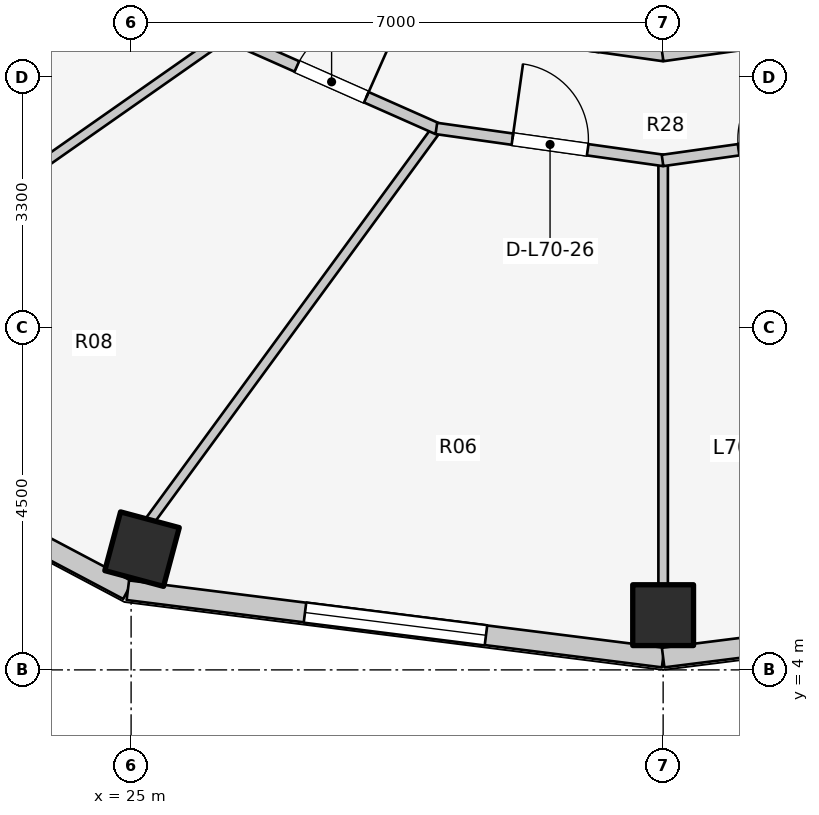
"""IFC4 building model, lengths in metres.
Left out: names, types, materials, properties, quantities, classifications, styles, units other than length and angle.
Written with IfcOpenShell. Run it as: python <this file> out.ifc"""

import sys

from ifc_helpers import new_model, si_unit, direction, frame, frame_2d, origin, origin_2d, place, context, subcontext, project, spatial, rectangle, extrude, element, fill, save


model = new_model("IFC4")
c1 = context("Model", 3, precision=1e-05, world=origin(), true_north=direction((0.0, 1.0)))
c2 = subcontext(c1, "Body", "Model", "MODEL_VIEW")
j1 = project(units=[si_unit("LENGTHUNIT", "METRE"), si_unit("PLANEANGLEUNIT", "RADIAN")], contexts=[c1])
p1 = place(None, origin())
s1 = spatial("IfcSite", under=j1, at=p1, CompositionType="ELEMENT")
p2 = place(p1, origin())
s2 = spatial("IfcBuilding", under=s1, at=p2, CompositionType="ELEMENT")
p3 = place(p2, frame((0.0, 0.0, 229.5)))
s3 = spatial("IfcBuildingStorey", under=s2, at=p3, CompositionType="ELEMENT", Elevation=229.5)
for number, where, z_axis, x_axis in (
    (1, (25.144, 5.589, 0.0), (0.0, 0.0, 1.0), (-0.259, -0.966, 0.0)),
    (2, (32.0, 4.72, 0.0), (0.0, 0.0, 1.0), (0.0, -1.0, 0.0)),
):
    element("IfcColumn", number, at=place(p3, frame(where, z_axis=z_axis, x_axis=x_axis)), inside=s3, PredefinedType="COLUMN", context=c2, shape_type="SweptSolid", body=[
        extrude(rectangle(XDim=0.8, YDim=0.8, at=origin_2d()), origin(), (0.0, 0.0, 1.0), 3.1),
    ])
p4 = place(p3, frame((20.13, 7.601, 0.0), z_axis=(0.0, 0.0, 1.0), x_axis=(0.884000981341, -0.46748504253, 0.0)))
e3 = element("IfcWall", 3, at=p4, inside=s3, PredefinedType="STANDARD", context=c2, shape_type="SweptSolid", body=[
    extrude(rectangle(XDim=5.46, YDim=0.26, at=frame_2d((2.73, 0.0))), origin(), (0.0, 0.0, 1.0), 2.85),
])
p5 = place(p4, frame((1.98, 0.0, 0.75)))
e4 = element("IfcOpeningElement", 4, at=p5, cuts=e3, PredefinedType="OPENING", context=c2, shape_type="SweptSolid", body=[
    extrude(rectangle(XDim=1.5, YDim=1.6, at=frame_2d((0.75, 0.8))), frame((0.0, 0.14, 0.0), z_axis=(0.0, -1.0, 0.0), x_axis=(1.0, 0.0, 0.0)), (0.0, 0.0, 1.0), 0.28),
])
p6 = place(p3, frame((24.957, 5.048, 0.0), z_axis=(0.0, 0.0, 1.0), x_axis=(0.992180211307, -0.124813574142, 0.0)))
e5 = element("IfcWall", 5, at=p6, inside=s3, PredefinedType="STANDARD", context=c2, shape_type="SweptSolid", body=[
    extrude(rectangle(XDim=7.098, YDim=0.26, at=frame_2d((3.549, 0.0))), origin(), (0.0, 0.0, 1.0), 2.85),
])
p7 = place(p6, frame((2.349, 0.0, 0.75)))
e6 = element("IfcOpeningElement", 6, at=p7, cuts=e5, PredefinedType="OPENING", context=c2, shape_type="SweptSolid", body=[
    extrude(rectangle(XDim=2.4, YDim=1.7, at=frame_2d((1.2, 0.85))), frame((0.0, 0.14, 0.0), z_axis=(0.0, -1.0, 0.0), x_axis=(1.0, 0.0, 0.0)), (0.0, 0.0, 1.0), 0.28),
])
p8 = place(p3, frame((32.0, 4.162, 0.0), z_axis=(0.0, 0.0, 1.0), x_axis=(0.992180211307, 0.124813574142, 0.0)))
e7 = element("IfcWall", 7, at=p8, inside=s3, PredefinedType="STANDARD", context=c2, shape_type="SweptSolid", body=[
    extrude(rectangle(XDim=7.098, YDim=0.26, at=frame_2d((3.549, 0.0))), origin(), (0.0, 0.0, 1.0), 2.85),
])
p9 = place(p8, frame((2.799, 0.0, 0.75)))
e8 = element("IfcOpeningElement", 8, at=p9, cuts=e7, PredefinedType="OPENING", context=c2, shape_type="SweptSolid", body=[
    extrude(rectangle(XDim=1.5, YDim=1.6, at=frame_2d((0.75, 0.8))), frame((0.0, 0.14, 0.0), z_axis=(0.0, -1.0, 0.0), x_axis=(1.0, 0.0, 0.0)), (0.0, 0.0, 1.0), 0.28),
])
p10 = place(p3, frame((32.0, 14.9, 0.0), z_axis=(0.0, 0.0, 1.0), x_axis=(0.0, -1.0, 0.0)))
e9 = element("IfcWall", 9, at=p10, inside=s3, PredefinedType="PARTITIONING", context=c2, shape_type="SweptSolid", body=[
    extrude(rectangle(XDim=2.818, YDim=0.125, at=frame_2d((1.409, 0.0))), origin(), (0.0, 0.0, 1.0), 2.376),
])
p11 = place(p3, frame((29.38, 12.455, 0.0), z_axis=(0.0, 0.0, 1.0), x_axis=(0.990096156252, -0.140390887794, 0.0)))
e10 = element("IfcWall", 10, at=p11, inside=s3, PredefinedType="PARTITIONING", context=c2, shape_type="SweptSolid", body=[
    extrude(rectangle(XDim=2.654, YDim=0.15, at=frame_2d((1.327, 0.0))), origin(), (0.0, 0.0, 1.0), 2.376),
])
p12 = place(p11, frame((0.852, 0.0, 0.0)))
e11 = element("IfcOpeningElement", 11, at=p12, cuts=e10, PredefinedType="OPENING", context=c2, shape_type="SweptSolid", body=[
    extrude(rectangle(XDim=0.95, YDim=2.1, at=frame_2d((0.475, 1.05))), frame((0.0, 0.085, 0.0), z_axis=(0.0, -1.0, 0.0), x_axis=(1.0, 0.0, 0.0)), (0.0, 0.0, 1.0), 0.17),
])
p13 = place(p3, frame((31.993, 12.082, 0.0), z_axis=(0.0, 0.0, 1.0), x_axis=(0.990096156252, 0.140390887794, 0.0)))
e12 = element("IfcWall", 12, at=p13, inside=s3, PredefinedType="PARTITIONING", context=c2, shape_type="SweptSolid", body=[
    extrude(rectangle(XDim=2.654, YDim=0.15, at=frame_2d((1.327, 0.0))), origin(), (0.0, 0.0, 1.0), 2.376),
])
p14 = place(p3, frame((26.206, 12.318, 0.0), z_axis=(0.0, 0.0, 1.0), x_axis=(-0.819017716307, -0.573768228796, 0.0)))
e13 = element("IfcWall", 13, at=p14, inside=s3, PredefinedType="PARTITIONING", context=c2, shape_type="SweptSolid", body=[
    extrude(rectangle(XDim=6.802, YDim=0.125, at=frame_2d((3.401, 0.0))), origin(), (0.0, 0.0, 1.0), 2.376),
])
p15 = place(p3, frame((28.992, 11.077, 0.0), z_axis=(0.0, 0.0, 1.0), x_axis=(-0.590771495169, -0.806838918555, 0.0)))
e14 = element("IfcWall", 14, at=p15, inside=s3, PredefinedType="PARTITIONING", context=c2, shape_type="SweptSolid", body=[
    extrude(rectangle(XDim=6.347, YDim=0.125, at=frame_2d((3.173, 0.0))), origin(), (0.0, 0.0, 1.0), 2.376),
])
p16 = place(p3, frame((32.0, 10.647, 0.0), z_axis=(0.0, 0.0, 1.0), x_axis=(0.0, -1.0, 0.0)))
e15 = element("IfcWall", 15, at=p16, inside=s3, PredefinedType="PARTITIONING", context=c2, shape_type="SweptSolid", body=[
    extrude(rectangle(XDim=5.547, YDim=0.125, at=frame_2d((2.773, 0.0))), origin(), (0.0, 0.0, 1.0), 2.376),
])
p17 = place(p3, frame((26.244, 12.354, 0.0), z_axis=(0.0, 0.0, 1.0), x_axis=(0.914302802833, -0.405031337963, 0.0)))
e16 = element("IfcWall", 16, at=p17, inside=s3, PredefinedType="PARTITIONING", context=c2, shape_type="SweptSolid", body=[
    extrude(rectangle(XDim=3.049, YDim=0.15, at=frame_2d((1.525, 0.0))), origin(), (0.0, 0.0, 1.0), 2.376),
])
p18 = place(p17, frame((1.025, 0.0, 0.0)))
e17 = element("IfcOpeningElement", 17, at=p18, cuts=e16, PredefinedType="OPENING", context=c2, shape_type="SweptSolid", body=[
    extrude(rectangle(XDim=1.0, YDim=2.1, at=frame_2d((0.5, 1.05))), frame((0.0, 0.085, 0.0), z_axis=(0.0, -1.0, 0.0), x_axis=(1.0, 0.0, 0.0)), (0.0, 0.0, 1.0), 0.17),
])
p19 = place(p3, frame((29.016, 11.123, 0.0), z_axis=(0.0, 0.0, 1.0), x_axis=(0.990225561979, -0.139475217886, 0.0)))
e18 = element("IfcWall", 18, at=p19, inside=s3, PredefinedType="PARTITIONING", context=c2, shape_type="SweptSolid", body=[
    extrude(rectangle(XDim=3.021, YDim=0.15, at=frame_2d((1.511, 0.0))), origin(), (0.0, 0.0, 1.0), 2.376),
])
p20 = place(p19, frame((1.01, 0.0, 0.0)))
e19 = element("IfcOpeningElement", 19, at=p20, cuts=e18, PredefinedType="OPENING", context=c2, shape_type="SweptSolid", body=[
    extrude(rectangle(XDim=1.0, YDim=2.1, at=frame_2d((0.5, 1.05))), frame((0.0, 0.085, 0.0), z_axis=(0.0, -1.0, 0.0), x_axis=(1.0, 0.0, 0.0)), (0.0, 0.0, 1.0), 0.17),
])
p21 = place(p3, frame((31.992, 10.702, 0.0), z_axis=(0.0, 0.0, 1.0), x_axis=(0.990225561979, 0.139475217886, 0.0)))
e20 = element("IfcWall", 20, at=p21, inside=s3, PredefinedType="PARTITIONING", context=c2, shape_type="SweptSolid", body=[
    extrude(rectangle(XDim=3.021, YDim=0.15, at=frame_2d((1.511, 0.0))), origin(), (0.0, 0.0, 1.0), 2.376),
])
p22 = place(p21, frame((1.01, 0.0, 0.0)))
e21 = element("IfcOpeningElement", 21, at=p22, cuts=e20, PredefinedType="OPENING", context=c2, shape_type="SweptSolid", body=[
    extrude(rectangle(XDim=1.0, YDim=2.1, at=frame_2d((0.5, 1.05))), frame((0.0, 0.085, 0.0), z_axis=(0.0, -1.0, 0.0), x_axis=(1.0, 0.0, 0.0)), (0.0, 0.0, 1.0), 0.17),
])
p23 = place(p7, origin())
e22 = element("IfcWindow", 22, at=p23, inside=s3, PartitioningType="SINGLE_PANEL", PredefinedType="WINDOW", context=c2, shape_type="SweptSolid", body=[
    extrude(rectangle(XDim=2.4, YDim=1.7, at=frame_2d((1.2, 0.85))), frame((0.0, 0.03, 0.0), z_axis=(0.0, -1.0, 0.0), x_axis=(1.0, 0.0, 0.0)), (0.0, 0.0, 1.0), 0.06),
])
fill(e6, e22)
p24 = place(p18, origin())
e23 = element("IfcDoor", 23, at=p24, inside=s3, OperationType="SINGLE_SWING_RIGHT", PredefinedType="DOOR", context=c2, shape_type="SweptSolid", body=[
    extrude(rectangle(XDim=1.0, YDim=2.1, at=frame_2d((0.5, 1.05))), frame((0.0, 0.025, 0.0), z_axis=(0.0, -1.0, 0.0), x_axis=(1.0, 0.0, 0.0)), (0.0, 0.0, 1.0), 0.05),
])
fill(e17, e23)
p25 = place(p20, origin())
e24 = element("IfcDoor", 24, at=p25, inside=s3, OperationType="SINGLE_SWING_LEFT", PredefinedType="DOOR", context=c2, shape_type="SweptSolid", body=[
    extrude(rectangle(XDim=1.0, YDim=2.1, at=frame_2d((0.5, 1.05))), frame((0.0, 0.025, 0.0), z_axis=(0.0, -1.0, 0.0), x_axis=(1.0, 0.0, 0.0)), (0.0, 0.0, 1.0), 0.05),
])
fill(e19, e24)
p26 = place(p22, origin())
e25 = element("IfcDoor", 25, at=p26, inside=s3, OperationType="SINGLE_SWING_RIGHT", PredefinedType="DOOR", context=c2, shape_type="SweptSolid", body=[
    extrude(rectangle(XDim=1.0, YDim=2.1, at=frame_2d((0.5, 1.05))), frame((0.0, 0.025, 0.0), z_axis=(0.0, -1.0, 0.0), x_axis=(1.0, 0.0, 0.0)), (0.0, 0.0, 1.0), 0.05),
])
fill(e21, e25)
save(model, sys.argv[1])
